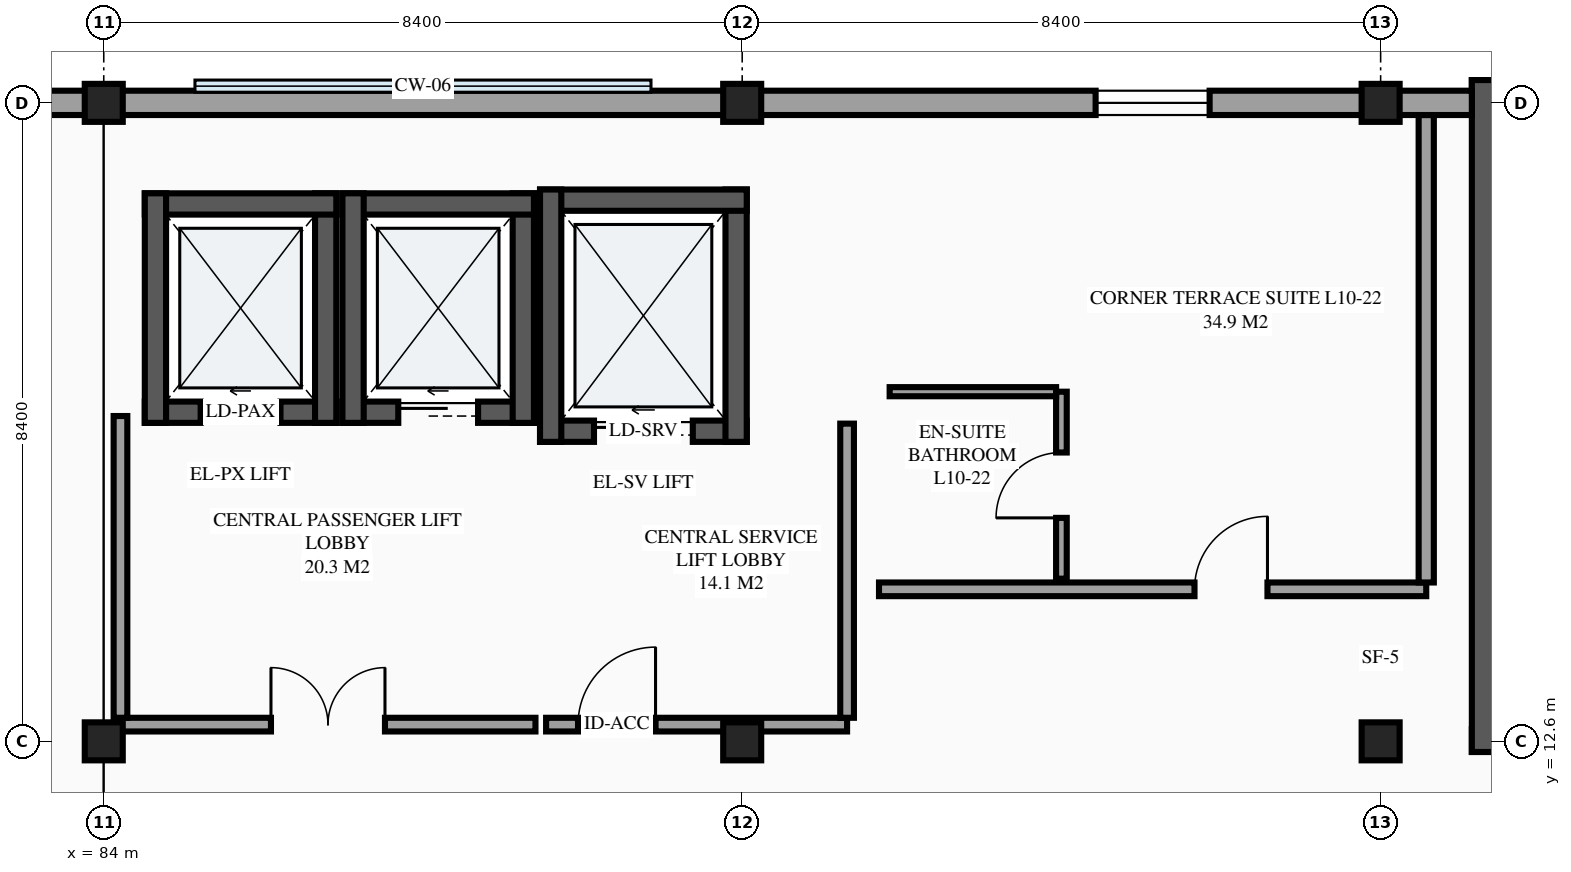
"""IFC4 building model, lengths in metres.
Left out: names, types, materials, properties, quantities, classifications, styles, units other than length and angle.
Written with IfcOpenShell. Run it as: python <this file> out.ifc"""

import sys

from ifc_helpers import new_model, si_unit, direction, frame, frame_2d, origin, origin_2d, place, context, subcontext, project, spatial, rectangle, extrude, element, fill, save


model = new_model("IFC4")
c1 = context("Model", 3, precision=1e-05, world=origin(), true_north=direction((0.0, 1.0)))
c2 = subcontext(c1, "Body", "Model", "MODEL_VIEW")
j1 = project(units=[si_unit("LENGTHUNIT", "METRE"), si_unit("PLANEANGLEUNIT", "RADIAN")], contexts=[c1])
p1 = place(None, origin())
s1 = spatial("IfcSite", under=j1, at=p1, CompositionType="ELEMENT")
p2 = place(p1, origin())
s2 = spatial("IfcBuilding", under=s1, at=p2, CompositionType="ELEMENT")
p3 = place(p2, frame((0.0, 0.0, 39.9)))
s3 = spatial("IfcBuildingStorey", under=s2, at=p3, CompositionType="ELEMENT", Elevation=39.9)
for number, where, z_axis, x_axis in (
    (1, (84.0, 12.6, 0.0), (0.0, 0.0, 1.0), (1.0, 0.0, 0.0)),
    (2, (84.0, 21.0, 0.0), (0.0, 0.0, 1.0), (1.0, 0.0, 0.0)),
    (3, (92.4, 12.6, 0.0), (0.0, 0.0, 1.0), (1.0, 0.0, 0.0)),
    (4, (92.4, 21.0, 0.0), (0.0, 0.0, 1.0), (1.0, 0.0, 0.0)),
    (5, (100.8, 12.6, 0.0), (0.0, 0.0, 1.0), (1.0, 0.0, 0.0)),
    (6, (100.8, 21.0, 0.0), (0.0, 0.0, 1.0), (1.0, 0.0, 0.0)),
):
    element("IfcColumn", number, at=place(p3, frame(where, z_axis=z_axis, x_axis=x_axis)), inside=s3, PredefinedType="COLUMN", context=c2, shape_type="SweptSolid", body=[
        extrude(rectangle(XDim=0.5, YDim=0.5, at=origin_2d()), origin(), (0.0, 0.0, 1.0), 3.6),
    ])
p4 = place(p3, frame((92.4, 21.0, 0.0), z_axis=(0.0, 0.0, 1.0), x_axis=(-1.0, 0.0, 0.0)))
e7 = element("IfcWall", 7, at=p4, inside=s3, PredefinedType="STANDARD", context=c2, shape_type="SweptSolid", body=[
    extrude(rectangle(XDim=10.4, YDim=0.32, at=frame_2d((5.2, 0.0))), origin(), (0.0, 0.0, 1.0), 2.63),
])
p5 = place(p3, frame((84.54, 16.93, 0.0), z_axis=(0.0, 0.0, 1.0), x_axis=(1.0, 0.0, 0.0)))
e8 = element("IfcWall", 8, at=p5, inside=s3, PredefinedType="SHEAR", context=c2, shape_type="SweptSolid", body=[
    extrude(rectangle(XDim=2.52, YDim=0.28, at=frame_2d((1.26, 0.0))), origin(), (0.0, 0.0, 1.0), 3.6),
])
p6 = place(p5, frame((0.735, 0.0, 0.0)))
e9 = element("IfcOpeningElement", 9, at=p6, cuts=e8, PredefinedType="OPENING", context=c2, shape_type="SweptSolid", body=[
    extrude(rectangle(XDim=1.05, YDim=2.2, at=frame_2d((0.525, 1.1))), frame((0.0, 0.15, 0.0), z_axis=(0.0, -1.0, 0.0), x_axis=(1.0, 0.0, 0.0)), (0.0, 0.0, 1.0), 0.3),
])
p7 = place(p3, frame((86.92, 16.79, 0.0), z_axis=(0.0, 0.0, 1.0), x_axis=(0.0, 1.0, 0.0)))
e10 = element("IfcWall", 10, at=p7, inside=s3, PredefinedType="SHEAR", context=c2, shape_type="SweptSolid", body=[
    extrude(rectangle(XDim=3.02, YDim=0.28, at=frame_2d((1.51, 0.0))), origin(), (0.0, 0.0, 1.0), 3.6),
])
p8 = place(p3, frame((87.06, 19.67, 0.0), z_axis=(0.0, 0.0, 1.0), x_axis=(-1.0, 0.0, 0.0)))
e11 = element("IfcWall", 11, at=p8, inside=s3, PredefinedType="SHEAR", context=c2, shape_type="SweptSolid", body=[
    extrude(rectangle(XDim=2.52, YDim=0.28, at=frame_2d((1.26, 0.0))), origin(), (0.0, 0.0, 1.0), 3.6),
])
p9 = place(p3, frame((84.68, 19.81, 0.0), z_axis=(0.0, 0.0, 1.0), x_axis=(0.0, -1.0, 0.0)))
e12 = element("IfcWall", 12, at=p9, inside=s3, PredefinedType="SHEAR", context=c2, shape_type="SweptSolid", body=[
    extrude(rectangle(XDim=3.02, YDim=0.28, at=frame_2d((1.51, 0.0))), origin(), (0.0, 0.0, 1.0), 3.6),
])
p10 = place(p3, frame((87.14, 16.93, 0.0), z_axis=(0.0, 0.0, 1.0), x_axis=(1.0, 0.0, 0.0)))
e13 = element("IfcWall", 13, at=p10, inside=s3, PredefinedType="SHEAR", context=c2, shape_type="SweptSolid", body=[
    extrude(rectangle(XDim=2.52, YDim=0.28, at=frame_2d((1.26, 0.0))), origin(), (0.0, 0.0, 1.0), 3.6),
])
p11 = place(p10, frame((0.735, 0.0, 0.0)))
e14 = element("IfcOpeningElement", 14, at=p11, cuts=e13, PredefinedType="OPENING", context=c2, shape_type="SweptSolid", body=[
    extrude(rectangle(XDim=1.05, YDim=2.2, at=frame_2d((0.525, 1.1))), frame((0.0, 0.15, 0.0), z_axis=(0.0, -1.0, 0.0), x_axis=(1.0, 0.0, 0.0)), (0.0, 0.0, 1.0), 0.3),
])
p12 = place(p3, frame((89.52, 16.79, 0.0), z_axis=(0.0, 0.0, 1.0), x_axis=(0.0, 1.0, 0.0)))
e15 = element("IfcWall", 15, at=p12, inside=s3, PredefinedType="SHEAR", context=c2, shape_type="SweptSolid", body=[
    extrude(rectangle(XDim=3.02, YDim=0.28, at=frame_2d((1.51, 0.0))), origin(), (0.0, 0.0, 1.0), 3.6),
])
p13 = place(p3, frame((89.66, 19.67, 0.0), z_axis=(0.0, 0.0, 1.0), x_axis=(-1.0, 0.0, 0.0)))
e16 = element("IfcWall", 16, at=p13, inside=s3, PredefinedType="SHEAR", context=c2, shape_type="SweptSolid", body=[
    extrude(rectangle(XDim=2.52, YDim=0.28, at=frame_2d((1.26, 0.0))), origin(), (0.0, 0.0, 1.0), 3.6),
])
p14 = place(p3, frame((87.28, 19.81, 0.0), z_axis=(0.0, 0.0, 1.0), x_axis=(0.0, -1.0, 0.0)))
e17 = element("IfcWall", 17, at=p14, inside=s3, PredefinedType="SHEAR", context=c2, shape_type="SweptSolid", body=[
    extrude(rectangle(XDim=3.02, YDim=0.28, at=frame_2d((1.51, 0.0))), origin(), (0.0, 0.0, 1.0), 3.6),
])
p15 = place(p3, frame((89.74, 16.68, 0.0), z_axis=(0.0, 0.0, 1.0), x_axis=(1.0, 0.0, 0.0)))
e18 = element("IfcWall", 18, at=p15, inside=s3, PredefinedType="SHEAR", context=c2, shape_type="SweptSolid", body=[
    extrude(rectangle(XDim=2.72, YDim=0.28, at=frame_2d((1.36, 0.0))), origin(), (0.0, 0.0, 1.0), 3.6),
])
p16 = place(p15, frame((0.71, 0.0, 0.0)))
e19 = element("IfcOpeningElement", 19, at=p16, cuts=e18, PredefinedType="OPENING", context=c2, shape_type="SweptSolid", body=[
    extrude(rectangle(XDim=1.3, YDim=2.25, at=frame_2d((0.65, 1.125))), frame((0.0, 0.15, 0.0), z_axis=(0.0, -1.0, 0.0), x_axis=(1.0, 0.0, 0.0)), (0.0, 0.0, 1.0), 0.3),
])
p17 = place(p3, frame((92.32, 16.54, 0.0), z_axis=(0.0, 0.0, 1.0), x_axis=(0.0, 1.0, 0.0)))
e20 = element("IfcWall", 20, at=p17, inside=s3, PredefinedType="SHEAR", context=c2, shape_type="SweptSolid", body=[
    extrude(rectangle(XDim=3.32, YDim=0.28, at=frame_2d((1.66, 0.0))), origin(), (0.0, 0.0, 1.0), 3.6),
])
p18 = place(p3, frame((92.46, 19.72, 0.0), z_axis=(0.0, 0.0, 1.0), x_axis=(-1.0, 0.0, 0.0)))
e21 = element("IfcWall", 21, at=p18, inside=s3, PredefinedType="SHEAR", context=c2, shape_type="SweptSolid", body=[
    extrude(rectangle(XDim=2.72, YDim=0.28, at=frame_2d((1.36, 0.0))), origin(), (0.0, 0.0, 1.0), 3.6),
])
p19 = place(p3, frame((89.88, 19.86, 0.0), z_axis=(0.0, 0.0, 1.0), x_axis=(0.0, -1.0, 0.0)))
e22 = element("IfcWall", 22, at=p19, inside=s3, PredefinedType="SHEAR", context=c2, shape_type="SweptSolid", body=[
    extrude(rectangle(XDim=3.32, YDim=0.28, at=frame_2d((1.66, 0.0))), origin(), (0.0, 0.0, 1.0), 3.6),
])
p20 = place(p3, frame((102.0, 12.61, 0.0), z_axis=(0.0, 0.0, 1.0), x_axis=(1.0, 0.0, 0.0)))
e23 = element("IfcWall", 23, at=p20, inside=s3, PredefinedType="SHEAR", context=c2, shape_type="SweptSolid", body=[
    extrude(rectangle(XDim=5.2, YDim=0.3, at=frame_2d((2.6, 0.0))), origin(), (0.0, 0.0, 1.0), 3.6),
])
p21 = place(p20, frame((2.025, 0.0, 0.0)))
e24 = element("IfcOpeningElement", 24, at=p21, cuts=e23, PredefinedType="OPENING", context=c2, shape_type="SweptSolid", body=[
    extrude(rectangle(XDim=1.15, YDim=2.15, at=frame_2d((0.575, 1.075))), frame((0.0, 0.16, 0.0), z_axis=(0.0, -1.0, 0.0), x_axis=(1.0, 0.0, 0.0)), (0.0, 0.0, 1.0), 0.32),
])
p22 = place(p3, frame((107.2, 21.15, 0.0), z_axis=(0.0, 0.0, 1.0), x_axis=(-1.0, 0.0, 0.0)))
e25 = element("IfcWall", 25, at=p22, inside=s3, PredefinedType="SHEAR", context=c2, shape_type="SweptSolid", body=[
    extrude(rectangle(XDim=5.2, YDim=0.3, at=frame_2d((2.6, 0.0))), origin(), (0.0, 0.0, 1.0), 3.6),
])
p23 = place(p3, frame((102.15, 21.3, 0.0), z_axis=(0.0, 0.0, 1.0), x_axis=(0.0, -1.0, 0.0)))
e26 = element("IfcWall", 26, at=p23, inside=s3, PredefinedType="SHEAR", context=c2, shape_type="SweptSolid", body=[
    extrude(rectangle(XDim=8.84, YDim=0.3, at=frame_2d((4.42, 0.0))), origin(), (0.0, 0.0, 1.0), 3.6),
])
p24 = place(p3, frame((94.2, 14.6, 0.0), z_axis=(0.0, 0.0, 1.0), x_axis=(1.0, 0.0, 0.0)))
e27 = element("IfcWall", 27, at=p24, inside=s3, PredefinedType="PARTITIONING", context=c2, shape_type="SweptSolid", body=[
    extrude(rectangle(XDim=7.2, YDim=0.18, at=frame_2d((3.6, 0.0))), origin(), (0.0, 0.0, 1.0), 3.375),
])
p25 = place(p24, frame((4.151, 0.0, 0.0)))
e28 = element("IfcOpeningElement", 28, at=p25, cuts=e27, PredefinedType="OPENING", context=c2, shape_type="SweptSolid", body=[
    extrude(rectangle(XDim=0.96, YDim=2.15, at=frame_2d((0.48, 1.075))), frame((0.0, 0.1, 0.0), z_axis=(0.0, -1.0, 0.0), x_axis=(1.0, 0.0, 0.0)), (0.0, 0.0, 1.0), 0.2),
])
p26 = place(p3, frame((101.4, 14.69, 0.0), z_axis=(0.0, 0.0, 1.0), x_axis=(0.0, 1.0, 0.0)))
e29 = element("IfcWall", 29, at=p26, inside=s3, PredefinedType="PARTITIONING", context=c2, shape_type="SweptSolid", body=[
    extrude(rectangle(XDim=6.15, YDim=0.2, at=frame_2d((3.075, 0.0))), origin(), (0.0, 0.0, 1.0), 3.375),
])
p27 = place(p3, frame((96.6, 14.74, 0.0), z_axis=(0.0, 0.0, 1.0), x_axis=(0.0, 1.0, 0.0)))
e30 = element("IfcWall", 30, at=p27, inside=s3, PredefinedType="PARTITIONING", context=c2, shape_type="SweptSolid", body=[
    extrude(rectangle(XDim=2.46, YDim=0.14, at=frame_2d((1.23, 0.0))), origin(), (0.0, 0.0, 1.0), 3.375),
])
p28 = place(p27, frame((0.8, 0.0, 0.0)))
e31 = element("IfcOpeningElement", 31, at=p28, cuts=e30, PredefinedType="OPENING", context=c2, shape_type="SweptSolid", body=[
    extrude(rectangle(XDim=0.86, YDim=2.1, at=frame_2d((0.43, 1.05))), frame((0.0, 0.08, 0.0), z_axis=(0.0, -1.0, 0.0), x_axis=(1.0, 0.0, 0.0)), (0.0, 0.0, 1.0), 0.16),
])
p29 = place(p3, frame((94.34, 17.2, 0.0), z_axis=(0.0, 0.0, 1.0), x_axis=(1.0, 0.0, 0.0)))
e32 = element("IfcWall", 32, at=p29, inside=s3, PredefinedType="PARTITIONING", context=c2, shape_type="SweptSolid", body=[
    extrude(rectangle(XDim=2.19, YDim=0.12, at=frame_2d((1.095, 0.0))), origin(), (0.0, 0.0, 1.0), 3.375),
])
p30 = place(p3, frame((84.22, 12.82, 0.0), z_axis=(0.0, 0.0, 1.0), x_axis=(1.0, 0.0, 0.0)))
e33 = element("IfcWall", 33, at=p30, inside=s3, PredefinedType="PARTITIONING", context=c2, shape_type="SweptSolid", body=[
    extrude(rectangle(XDim=5.46, YDim=0.18, at=frame_2d((2.73, 0.0))), origin(), (0.0, 0.0, 1.0), 2.63),
])
p31 = place(p30, frame((1.98, 0.0, 0.0)))
e34 = element("IfcOpeningElement", 34, at=p31, cuts=e33, PredefinedType="OPENING", context=c2, shape_type="SweptSolid", body=[
    extrude(rectangle(XDim=1.5, YDim=2.15, at=frame_2d((0.75, 1.075))), frame((0.0, 0.1, 0.0), z_axis=(0.0, -1.0, 0.0), x_axis=(1.0, 0.0, 0.0)), (0.0, 0.0, 1.0), 0.2),
])
p32 = place(p3, frame((84.22, 12.91, 0.0), z_axis=(0.0, 0.0, 1.0), x_axis=(0.0, 1.0, 0.0)))
e35 = element("IfcWall", 35, at=p32, inside=s3, PredefinedType="PARTITIONING", context=c2, shape_type="SweptSolid", body=[
    extrude(rectangle(XDim=3.97, YDim=0.18, at=frame_2d((1.985, 0.0))), origin(), (0.0, 0.0, 1.0), 2.58),
])
p33 = place(p3, frame((89.82, 12.82, 0.0), z_axis=(0.0, 0.0, 1.0), x_axis=(1.0, 0.0, 0.0)))
e36 = element("IfcWall", 36, at=p33, inside=s3, PredefinedType="PARTITIONING", context=c2, shape_type="SweptSolid", body=[
    extrude(rectangle(XDim=3.96, YDim=0.18, at=frame_2d((1.98, 0.0))), origin(), (0.0, 0.0, 1.0), 2.63),
])
p34 = place(p33, frame((0.42, 0.0, 0.0)))
e37 = element("IfcOpeningElement", 37, at=p34, cuts=e36, PredefinedType="OPENING", context=c2, shape_type="SweptSolid", body=[
    extrude(rectangle(XDim=1.02, YDim=2.15, at=frame_2d((0.51, 1.075))), frame((0.0, 0.1, 0.0), z_axis=(0.0, -1.0, 0.0), x_axis=(1.0, 0.0, 0.0)), (0.0, 0.0, 1.0), 0.2),
])
p35 = place(p3, frame((93.78, 12.91, 0.0), z_axis=(0.0, 0.0, 1.0), x_axis=(0.0, 1.0, 0.0)))
e38 = element("IfcWall", 38, at=p35, inside=s3, PredefinedType="PARTITIONING", context=c2, shape_type="SweptSolid", body=[
    extrude(rectangle(XDim=3.87, YDim=0.18, at=frame_2d((1.935, 0.0))), origin(), (0.0, 0.0, 1.0), 3.375),
])
p36 = place(p3, frame((102.0, 21.0, 0.0), z_axis=(0.0, 0.0, 1.0), x_axis=(-1.0, 0.0, 0.0)))
e39 = element("IfcWall", 39, at=p36, inside=s3, PredefinedType="STANDARD", context=c2, shape_type="SweptSolid", body=[
    extrude(rectangle(XDim=1.2, YDim=0.32, at=frame_2d((0.6, 0.0))), origin(), (0.0, 0.0, 1.0), 2.78),
])
p37 = place(p3, frame((100.8, 21.0, 0.0), z_axis=(0.0, 0.0, 1.0), x_axis=(-1.0, 0.0, 0.0)))
e40 = element("IfcWall", 40, at=p37, inside=s3, PredefinedType="STANDARD", context=c2, shape_type="SweptSolid", body=[
    extrude(rectangle(XDim=8.4, YDim=0.32, at=frame_2d((4.2, 0.0))), origin(), (0.0, 0.0, 1.0), 3.075),
])
p38 = place(p37, frame((2.25, 0.0, 0.85)))
e41 = element("IfcOpeningElement", 41, at=p38, cuts=e40, PredefinedType="OPENING", context=c2, shape_type="SweptSolid", body=[
    extrude(rectangle(XDim=1.5, YDim=1.5, at=frame_2d((0.75, 0.75))), frame((0.0, 0.17, 0.0), z_axis=(0.0, -1.0, 0.0), x_axis=(1.0, 0.0, 0.0)), (0.0, 0.0, 1.0), 0.34),
])
p39 = place(p38, origin())
e42 = element("IfcWindow", 42, at=p39, inside=s3, PartitioningType="SINGLE_PANEL", PredefinedType="WINDOW", context=c2, shape_type="SweptSolid", body=[
    extrude(rectangle(XDim=1.5, YDim=1.5, at=frame_2d((0.75, 0.75))), frame((0.0, 0.03, 0.0), z_axis=(0.0, -1.0, 0.0), x_axis=(1.0, 0.0, 0.0)), (0.0, 0.0, 1.0), 0.06),
])
fill(e41, e42)
p40 = place(p6, origin())
e43 = element("IfcDoor", 43, at=p40, inside=s3, OperationType="SLIDING_TO_LEFT", PredefinedType="DOOR", context=c2, shape_type="SweptSolid", body=[
    extrude(rectangle(XDim=1.05, YDim=2.2, at=frame_2d((0.525, 1.1))), frame((0.0, 0.025, 0.0), z_axis=(0.0, -1.0, 0.0), x_axis=(1.0, 0.0, 0.0)), (0.0, 0.0, 1.0), 0.05),
])
fill(e9, e43)
p41 = place(p11, origin())
e44 = element("IfcDoor", 44, at=p41, inside=s3, OperationType="SLIDING_TO_LEFT", PredefinedType="DOOR", context=c2, shape_type="SweptSolid", body=[
    extrude(rectangle(XDim=1.05, YDim=2.2, at=frame_2d((0.525, 1.1))), frame((0.0, 0.025, 0.0), z_axis=(0.0, -1.0, 0.0), x_axis=(1.0, 0.0, 0.0)), (0.0, 0.0, 1.0), 0.05),
])
fill(e14, e44)
p42 = place(p16, origin())
e45 = element("IfcDoor", 45, at=p42, inside=s3, OperationType="SLIDING_TO_LEFT", PredefinedType="DOOR", context=c2, shape_type="SweptSolid", body=[
    extrude(rectangle(XDim=1.3, YDim=2.25, at=frame_2d((0.65, 1.125))), frame((0.0, 0.025, 0.0), z_axis=(0.0, -1.0, 0.0), x_axis=(1.0, 0.0, 0.0)), (0.0, 0.0, 1.0), 0.05),
])
fill(e19, e45)
p43 = place(p25, origin())
e46 = element("IfcDoor", 46, at=p43, inside=s3, OperationType="SINGLE_SWING_RIGHT", PredefinedType="DOOR", context=c2, shape_type="SweptSolid", body=[
    extrude(rectangle(XDim=0.96, YDim=2.15, at=frame_2d((0.48, 1.075))), frame((0.0, 0.025, 0.0), z_axis=(0.0, -1.0, 0.0), x_axis=(1.0, 0.0, 0.0)), (0.0, 0.0, 1.0), 0.05),
])
fill(e28, e46)
p44 = place(p28, origin())
e47 = element("IfcDoor", 47, at=p44, inside=s3, OperationType="SINGLE_SWING_LEFT", PredefinedType="DOOR", context=c2, shape_type="SweptSolid", body=[
    extrude(rectangle(XDim=0.86, YDim=2.1, at=frame_2d((0.43, 1.05))), frame((0.0, 0.025, 0.0), z_axis=(0.0, -1.0, 0.0), x_axis=(1.0, 0.0, 0.0)), (0.0, 0.0, 1.0), 0.05),
])
fill(e31, e47)
p45 = place(p31, origin())
e48 = element("IfcDoor", 48, at=p45, inside=s3, OperationType="DOUBLE_DOOR_SINGLE_SWING", PredefinedType="DOOR", context=c2, shape_type="SweptSolid", body=[
    extrude(rectangle(XDim=1.5, YDim=2.15, at=frame_2d((0.75, 1.075))), frame((0.0, 0.025, 0.0), z_axis=(0.0, -1.0, 0.0), x_axis=(1.0, 0.0, 0.0)), (0.0, 0.0, 1.0), 0.05),
])
fill(e34, e48)
p46 = place(p34, origin())
e49 = element("IfcDoor", 49, at=p46, inside=s3, OperationType="SINGLE_SWING_RIGHT", PredefinedType="DOOR", context=c2, shape_type="SweptSolid", body=[
    extrude(rectangle(XDim=1.02, YDim=2.15, at=frame_2d((0.51, 1.075))), frame((0.0, 0.025, 0.0), z_axis=(0.0, -1.0, 0.0), x_axis=(1.0, 0.0, 0.0)), (0.0, 0.0, 1.0), 0.05),
])
fill(e37, e49)
save(model, sys.argv[1])
